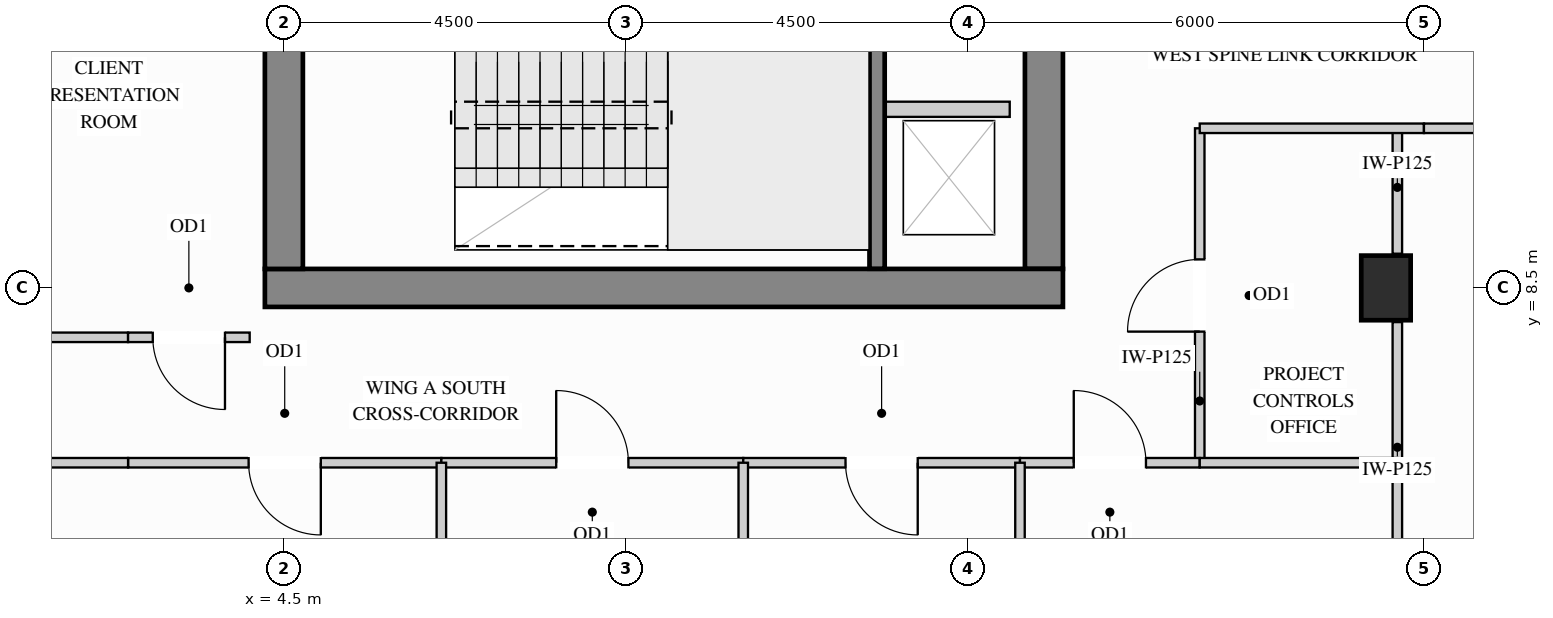
"""IFC4 building model, lengths in metres.
Left out: names, types, materials, properties, quantities, classifications, styles, units other than length and angle.
Written with IfcOpenShell. Run it as: python <this file> out.ifc"""

import sys

from ifc_helpers import new_model, si_unit, direction, frame, frame_2d, origin, origin_2d, place, context, subcontext, project, spatial, rectangle, extrude, source, transform, mapped, element, fill, save


model = new_model("IFC4")
c1 = context("Model", 3, precision=1e-05, world=origin(), true_north=direction((0.0, 1.0)))
c2 = subcontext(c1, "Body", "Model", "MODEL_VIEW")
j1 = project(units=[si_unit("LENGTHUNIT", "METRE"), si_unit("PLANEANGLEUNIT", "RADIAN")], contexts=[c1])
p1 = place(None, origin())
s1 = spatial("IfcSite", under=j1, at=p1, CompositionType="ELEMENT")
p2 = place(p1, origin())
s2 = spatial("IfcBuilding", under=s1, at=p2, CompositionType="ELEMENT")
p3 = place(p2, frame((0.0, 0.0, 219.6)))
s3 = spatial("IfcBuildingStorey", under=s2, at=p3, CompositionType="ELEMENT", Elevation=219.6)
m1 = source(origin(), c2, "Body", "SweptSolid", [
    extrude(rectangle(XDim=0.65, YDim=0.85, at=origin_2d()), origin(), (0.0, 0.0, 1.0), 3.4),
])
p4 = place(p3, frame((19.0, 8.5, 0.0), z_axis=(0.0, 0.0, 1.0), x_axis=(1.0, 0.0, 0.0)))
e1 = element("IfcColumn", 1, at=p4, inside=s3, PredefinedType="COLUMN", context=c2, shape_type="MappedRepresentation", body=[
    mapped(m1, transform((0.0, 0.0, 0.0), x_axis=(1.0, 0.0, 0.0), y_axis=(0.0, 1.0, 0.0), z_axis=(0.0, 0.0, 1.0))),
])
m2 = source(origin(), c2, "Body", "SweptSolid", [
    extrude(rectangle(XDim=10.07, YDim=0.5, at=frame_2d((5.035, 0.0))), origin(), (0.0, 0.0, 1.0), 3.4),
])
p5 = place(p3, frame((14.5, 8.75, 0.0), z_axis=(0.0, 0.0, 1.0), x_axis=(0.0, 1.0, 0.0)))
e2 = element("IfcWall", 2, at=p5, inside=s3, PredefinedType="SHEAR", context=c2, shape_type="MappedRepresentation", body=[
    mapped(m2, transform((0.0, 0.0, 0.0), x_axis=(1.0, 0.0, 0.0), y_axis=(0.0, 1.0, 0.0), z_axis=(0.0, 0.0, 1.0))),
])
m3 = source(origin(), c2, "Body", "SweptSolid", [
    extrude(rectangle(XDim=10.5, YDim=0.5, at=frame_2d((5.25, 0.0))), origin(), (0.0, 0.0, 1.0), 3.4),
])
p6 = place(p3, frame((4.25, 8.5, 0.0), z_axis=(0.0, 0.0, 1.0), x_axis=(1.0, 0.0, 0.0)))
e3 = element("IfcWall", 3, at=p6, inside=s3, PredefinedType="SHEAR", context=c2, shape_type="MappedRepresentation", body=[
    mapped(m3, transform((0.0, 0.0, 0.0), x_axis=(1.0, 0.0, 0.0), y_axis=(0.0, 1.0, 0.0), z_axis=(0.0, 0.0, 1.0))),
])
m4 = source(origin(), c2, "Body", "SweptSolid", [
    extrude(rectangle(XDim=20.5, YDim=0.5, at=frame_2d((10.25, 0.0))), origin(), (0.0, 0.0, 1.0), 3.4),
])
p7 = place(p3, frame((4.5, 8.75, 0.0), z_axis=(0.0, 0.0, 1.0), x_axis=(0.0, 1.0, 0.0)))
e4 = element("IfcWall", 4, at=p7, inside=s3, PredefinedType="SHEAR", context=c2, shape_type="MappedRepresentation", body=[
    mapped(m4, transform((0.0, 0.0, 0.0), x_axis=(1.0, 0.0, 0.0), y_axis=(0.0, 1.0, 0.0), z_axis=(0.0, 0.0, 1.0))),
])
m5 = source(origin(), c2, "Body", "SweptSolid", [
    extrude(rectangle(XDim=3.198, YDim=0.125, at=frame_2d((1.599, 0.0))), origin(), (0.0, 0.0, 1.0), 2.773),
])
p8 = place(p3, frame((19.15, 4.852, 0.0), z_axis=(0.0, 0.0, 1.0), x_axis=(0.0, 1.0, 0.0)))
e5 = element("IfcWall", 5, at=p8, inside=s3, PredefinedType="PARTITIONING", context=c2, shape_type="MappedRepresentation", body=[
    mapped(m5, transform((0.0, 0.0, 0.0), x_axis=(1.0, 0.0, 0.0), y_axis=(0.0, 1.0, 0.0), z_axis=(0.0, 0.0, 1.0))),
])
m6 = source(origin(), c2, "Body", "SweptSolid", [
    extrude(rectangle(XDim=1.65, YDim=0.125, at=frame_2d((0.825, 0.0))), origin(), (0.0, 0.0, 1.0), 2.773),
])
p9 = place(p3, frame((19.15, 8.95, 0.0), z_axis=(0.0, 0.0, 1.0), x_axis=(0.0, 1.0, 0.0)))
e6 = element("IfcWall", 6, at=p9, inside=s3, PredefinedType="PARTITIONING", context=c2, shape_type="MappedRepresentation", body=[
    mapped(m6, transform((0.0, 0.0, 0.0), x_axis=(1.0, 0.0, 0.0), y_axis=(0.0, 1.0, 0.0), z_axis=(0.0, 0.0, 1.0))),
])
p10 = place(p3, frame((16.55, 6.2, 0.0), z_axis=(0.0, 0.0, 1.0), x_axis=(0.0, 1.0, 0.0)))
e7 = element("IfcWall", 7, at=p10, inside=s3, PredefinedType="PARTITIONING", context=c2, shape_type="SweptSolid", body=[
    extrude(rectangle(XDim=4.4, YDim=0.125, at=frame_2d((2.2, 0.0))), origin(), (0.0, 0.0, 1.0), 3.385),
])
p11 = place(p10, frame((1.725, 0.0, 0.0)))
e8 = element("IfcOpeningElement", 8, at=p11, cuts=e7, PredefinedType="OPENING", context=c2, shape_type="SweptSolid", body=[
    extrude(rectangle(XDim=0.95, YDim=2.15, at=frame_2d((0.475, 1.075))), frame((0.0, 0.073, 0.0), z_axis=(0.0, -1.0, 0.0), x_axis=(1.0, 0.0, 0.0)), (0.0, 0.0, 1.0), 0.145),
])
m7 = source(origin(), c2, "Body", "SweptSolid", [
    extrude(rectangle(XDim=2.098, YDim=0.125, at=frame_2d((1.049, 0.0))), origin(), (0.0, 0.0, 1.0), 3.385),
])
p12 = place(p3, frame((0.352, 7.85, 0.0), z_axis=(0.0, 0.0, 1.0), x_axis=(1.0, 0.0, 0.0)))
e9 = element("IfcWall", 9, at=p12, inside=s3, PredefinedType="PARTITIONING", context=c2, shape_type="MappedRepresentation", body=[
    mapped(m7, transform((0.0, 0.0, 0.0), x_axis=(1.0, 0.0, 0.0), y_axis=(0.0, 1.0, 0.0), z_axis=(0.0, 0.0, 1.0))),
])
p13 = place(p3, frame((2.45, 7.85, 0.0), z_axis=(0.0, 0.0, 1.0), x_axis=(1.0, 0.0, 0.0)))
e10 = element("IfcWall", 10, at=p13, inside=s3, PredefinedType="PARTITIONING", context=c2, shape_type="SweptSolid", body=[
    extrude(rectangle(XDim=1.6, YDim=0.125, at=frame_2d((0.8, 0.0))), origin(), (0.0, 0.0, 1.0), 3.385),
])
p14 = place(p13, frame((0.325, 0.0, 0.0)))
e11 = element("IfcOpeningElement", 11, at=p14, cuts=e10, PredefinedType="OPENING", context=c2, shape_type="SweptSolid", body=[
    extrude(rectangle(XDim=0.95, YDim=2.15, at=frame_2d((0.475, 1.075))), frame((0.0, 0.073, 0.0), z_axis=(0.0, -1.0, 0.0), x_axis=(1.0, 0.0, 0.0)), (0.0, 0.0, 1.0), 0.145),
])
m8 = source(origin(), c2, "Body", "SweptSolid", [
    extrude(rectangle(XDim=2.95, YDim=0.125, at=frame_2d((1.475, 0.0))), origin(), (0.0, 0.0, 1.0), 3.385),
])
p15 = place(p3, frame((16.55, 10.6, 0.0), z_axis=(0.0, 0.0, 1.0), x_axis=(1.0, 0.0, 0.0)))
e12 = element("IfcWall", 12, at=p15, inside=s3, PredefinedType="PARTITIONING", context=c2, shape_type="MappedRepresentation", body=[
    mapped(m8, transform((0.0, 0.0, 0.0), x_axis=(1.0, 0.0, 0.0), y_axis=(0.0, 1.0, 0.0), z_axis=(0.0, 0.0, 1.0))),
])
p16 = place(p3, frame((19.5, 10.6, 0.0), z_axis=(0.0, 0.0, 1.0), x_axis=(1.0, 0.0, 0.0)))
e13 = element("IfcWall", 13, at=p16, inside=s3, PredefinedType="PARTITIONING", context=c2, shape_type="SweptSolid", body=[
    extrude(rectangle(XDim=4.35, YDim=0.125, at=frame_2d((2.175, 0.0))), origin(), (0.0, 0.0, 1.0), 3.385),
])
p17 = place(p16, frame((1.7, 0.0, 0.0)))
e14 = element("IfcOpeningElement", 14, at=p17, cuts=e13, PredefinedType="OPENING", context=c2, shape_type="SweptSolid", body=[
    extrude(rectangle(XDim=0.95, YDim=2.15, at=frame_2d((0.475, 1.075))), frame((0.0, 0.073, 0.0), z_axis=(0.0, -1.0, 0.0), x_axis=(1.0, 0.0, 0.0)), (0.0, 0.0, 1.0), 0.145),
])
p18 = place(p3, frame((2.45, 6.2, 0.0), z_axis=(0.0, 0.0, 1.0), x_axis=(1.0, 0.0, 0.0)))
e15 = element("IfcWall", 15, at=p18, inside=s3, PredefinedType="PARTITIONING", context=c2, shape_type="SweptSolid", body=[
    extrude(rectangle(XDim=4.122, YDim=0.125, at=frame_2d((2.061, 0.0))), origin(), (0.0, 0.0, 1.0), 2.848),
])
p19 = place(p18, frame((1.586, 0.0, 0.0)))
e16 = element("IfcOpeningElement", 16, at=p19, cuts=e15, PredefinedType="OPENING", context=c2, shape_type="SweptSolid", body=[
    extrude(rectangle(XDim=0.95, YDim=2.15, at=frame_2d((0.475, 1.075))), frame((0.0, 0.073, 0.0), z_axis=(0.0, -1.0, 0.0), x_axis=(1.0, 0.0, 0.0)), (0.0, 0.0, 1.0), 0.145),
])
p20 = place(p3, frame((6.572, 6.2, 0.0), z_axis=(0.0, 0.0, 1.0), x_axis=(1.0, 0.0, 0.0)))
e17 = element("IfcWall", 17, at=p20, inside=s3, PredefinedType="PARTITIONING", context=c2, shape_type="SweptSolid", body=[
    extrude(rectangle(XDim=3.972, YDim=0.125, at=frame_2d((1.986, 0.0))), origin(), (0.0, 0.0, 1.0), 2.848),
])
p21 = place(p20, frame((1.511, 0.0, 0.0)))
e18 = element("IfcOpeningElement", 18, at=p21, cuts=e17, PredefinedType="OPENING", context=c2, shape_type="SweptSolid", body=[
    extrude(rectangle(XDim=0.95, YDim=2.15, at=frame_2d((0.475, 1.075))), frame((0.0, 0.073, 0.0), z_axis=(0.0, -1.0, 0.0), x_axis=(1.0, 0.0, 0.0)), (0.0, 0.0, 1.0), 0.145),
])
p22 = place(p3, frame((10.544, 6.2, 0.0), z_axis=(0.0, 0.0, 1.0), x_axis=(1.0, 0.0, 0.0)))
e19 = element("IfcWall", 19, at=p22, inside=s3, PredefinedType="PARTITIONING", context=c2, shape_type="SweptSolid", body=[
    extrude(rectangle(XDim=3.641, YDim=0.125, at=frame_2d((1.821, 0.0))), origin(), (0.0, 0.0, 1.0), 2.848),
])
p23 = place(p22, frame((1.345, 0.0, 0.0)))
e20 = element("IfcOpeningElement", 20, at=p23, cuts=e19, PredefinedType="OPENING", context=c2, shape_type="SweptSolid", body=[
    extrude(rectangle(XDim=0.95, YDim=2.15, at=frame_2d((0.475, 1.075))), frame((0.0, 0.073, 0.0), z_axis=(0.0, -1.0, 0.0), x_axis=(1.0, 0.0, 0.0)), (0.0, 0.0, 1.0), 0.145),
])
p24 = place(p3, frame((14.185, 6.2, 0.0), z_axis=(0.0, 0.0, 1.0), x_axis=(1.0, 0.0, 0.0)))
e21 = element("IfcWall", 21, at=p24, inside=s3, PredefinedType="PARTITIONING", context=c2, shape_type="SweptSolid", body=[
    extrude(rectangle(XDim=2.365, YDim=0.125, at=frame_2d((1.183, 0.0))), origin(), (0.0, 0.0, 1.0), 2.848),
])
p25 = place(p24, frame((0.708, 0.0, 0.0)))
e22 = element("IfcOpeningElement", 22, at=p25, cuts=e21, PredefinedType="OPENING", context=c2, shape_type="SweptSolid", body=[
    extrude(rectangle(XDim=0.95, YDim=2.15, at=frame_2d((0.475, 1.075))), frame((0.0, 0.073, 0.0), z_axis=(0.0, -1.0, 0.0), x_axis=(1.0, 0.0, 0.0)), (0.0, 0.0, 1.0), 0.145),
])
m9 = source(origin(), c2, "Body", "SweptSolid", [
    extrude(rectangle(XDim=2.098, YDim=0.125, at=frame_2d((1.049, 0.0))), origin(), (0.0, 0.0, 1.0), 2.848),
])
p26 = place(p3, frame((0.352, 6.2, 0.0), z_axis=(0.0, 0.0, 1.0), x_axis=(1.0, 0.0, 0.0)))
e23 = element("IfcWall", 23, at=p26, inside=s3, PredefinedType="PARTITIONING", context=c2, shape_type="MappedRepresentation", body=[
    mapped(m9, transform((0.0, 0.0, 0.0), x_axis=(1.0, 0.0, 0.0), y_axis=(0.0, 1.0, 0.0), z_axis=(0.0, 0.0, 1.0))),
])
m10 = source(origin(), c2, "Body", "SweptSolid", [
    extrude(rectangle(XDim=2.6, YDim=0.125, at=frame_2d((1.3, 0.0))), origin(), (0.0, 0.0, 1.0), 2.848),
])
p27 = place(p3, frame((16.55, 6.2, 0.0), z_axis=(0.0, 0.0, 1.0), x_axis=(1.0, 0.0, 0.0)))
e24 = element("IfcWall", 24, at=p27, inside=s3, PredefinedType="PARTITIONING", context=c2, shape_type="MappedRepresentation", body=[
    mapped(m10, transform((0.0, 0.0, 0.0), x_axis=(1.0, 0.0, 0.0), y_axis=(0.0, 1.0, 0.0), z_axis=(0.0, 0.0, 1.0))),
])
m11 = source(origin(), c2, "Body", "SweptSolid", [
    extrude(rectangle(XDim=5.848, YDim=0.125, at=frame_2d((2.924, 0.0))), origin(), (0.0, 0.0, 1.0), 3.385),
])
for number, where, z_axis, x_axis in (
    (25, (6.572, 0.352, 0.0), (0.0, 0.0, 1.0), (0.0, 1.0, 0.0)),
    (26, (10.544, 0.352, 0.0), (0.0, 0.0, 1.0), (0.0, 1.0, 0.0)),
):
    element("IfcWall", number, at=place(p3, frame(where, z_axis=z_axis, x_axis=x_axis)), inside=s3, PredefinedType="PARTITIONING", context=c2, shape_type="MappedRepresentation", body=[
        mapped(m11, transform((0.0, 0.0, 0.0), x_axis=(1.0, 0.0, 0.0), y_axis=(0.0, 1.0, 0.0), z_axis=(0.0, 0.0, 1.0))),
    ])
m12 = source(origin(), c2, "Body", "SweptSolid", [
    extrude(rectangle(XDim=5.15, YDim=0.125, at=frame_2d((2.575, 0.0))), origin(), (0.0, 0.0, 1.0), 3.385),
])
p28 = place(p3, frame((14.185, 1.05, 0.0), z_axis=(0.0, 0.0, 1.0), x_axis=(0.0, 1.0, 0.0)))
e27 = element("IfcWall", 27, at=p28, inside=s3, PredefinedType="PARTITIONING", context=c2, shape_type="MappedRepresentation", body=[
    mapped(m12, transform((0.0, 0.0, 0.0), x_axis=(1.0, 0.0, 0.0), y_axis=(0.0, 1.0, 0.0), z_axis=(0.0, 0.0, 1.0))),
])
m13 = source(origin(), c2, "Body", "SweptSolid", [
    extrude(rectangle(XDim=1.63, YDim=0.2, at=frame_2d((0.815, 0.0))), origin(), (0.0, 0.0, 1.0), 3.385),
])
p29 = place(p3, frame((12.42, 10.85, 0.0), z_axis=(0.0, 0.0, 1.0), x_axis=(1.0, 0.0, 0.0)))
e28 = element("IfcWall", 28, at=p29, inside=s3, PredefinedType="PARTITIONING", context=c2, shape_type="MappedRepresentation", body=[
    mapped(m13, transform((0.0, 0.0, 0.0), x_axis=(1.0, 0.0, 0.0), y_axis=(0.0, 1.0, 0.0), z_axis=(0.0, 0.0, 1.0))),
])
m14 = source(origin(), c2, "Body", "SweptSolid", [
    extrude(rectangle(XDim=3.803, YDim=0.2, at=frame_2d((1.901, 0.0))), origin(), (0.0, 0.0, 1.0), 3.4),
])
p30 = place(p3, frame((12.305, 8.752, 0.0), z_axis=(0.0, 0.0, 1.0), x_axis=(0.0, 1.0, 0.0)))
e29 = element("IfcWall", 29, at=p30, inside=s3, PredefinedType="SHEAR", context=c2, shape_type="MappedRepresentation", body=[
    mapped(m14, transform((0.0, 0.0, 0.0), x_axis=(1.0, 0.0, 0.0), y_axis=(0.0, 1.0, 0.0), z_axis=(0.0, 0.0, 1.0))),
])
m15 = source(origin(), c2, "Body", "SweptSolid", [
    extrude(rectangle(XDim=0.95, YDim=2.15, at=frame_2d((0.475, 1.075))), frame((0.0, 0.025, 0.0), z_axis=(0.0, -1.0, 0.0), x_axis=(1.0, 0.0, 0.0)), (0.0, 0.0, 1.0), 0.05),
])
p31 = place(p11, origin())
e30 = element("IfcDoor", 30, at=p31, inside=s3, OperationType="SINGLE_SWING_LEFT", PredefinedType="DOOR", context=c2, shape_type="MappedRepresentation", body=[
    mapped(m15, transform((0.0, 0.0, 0.0), x_axis=(1.0, 0.0, 0.0), y_axis=(0.0, 1.0, 0.0), z_axis=(0.0, 0.0, 1.0))),
])
fill(e8, e30)
p32 = place(p19, origin())
e31 = element("IfcDoor", 31, at=p32, inside=s3, OperationType="SINGLE_SWING_RIGHT", PredefinedType="DOOR", context=c2, shape_type="MappedRepresentation", body=[
    mapped(m15, transform((0.0, 0.0, 0.0), x_axis=(1.0, 0.0, 0.0), y_axis=(0.0, 1.0, 0.0), z_axis=(0.0, 0.0, 1.0))),
])
fill(e16, e31)
p33 = place(p21, origin())
e32 = element("IfcDoor", 32, at=p33, inside=s3, OperationType="SINGLE_SWING_LEFT", PredefinedType="DOOR", context=c2, shape_type="MappedRepresentation", body=[
    mapped(m15, transform((0.0, 0.0, 0.0), x_axis=(1.0, 0.0, 0.0), y_axis=(0.0, 1.0, 0.0), z_axis=(0.0, 0.0, 1.0))),
])
fill(e18, e32)
p34 = place(p23, origin())
e33 = element("IfcDoor", 33, at=p34, inside=s3, OperationType="SINGLE_SWING_RIGHT", PredefinedType="DOOR", context=c2, shape_type="MappedRepresentation", body=[
    mapped(m15, transform((0.0, 0.0, 0.0), x_axis=(1.0, 0.0, 0.0), y_axis=(0.0, 1.0, 0.0), z_axis=(0.0, 0.0, 1.0))),
])
fill(e20, e33)
p35 = place(p25, origin())
e34 = element("IfcDoor", 34, at=p35, inside=s3, OperationType="SINGLE_SWING_LEFT", PredefinedType="DOOR", context=c2, shape_type="MappedRepresentation", body=[
    mapped(m15, transform((0.0, 0.0, 0.0), x_axis=(1.0, 0.0, 0.0), y_axis=(0.0, 1.0, 0.0), z_axis=(0.0, 0.0, 1.0))),
])
fill(e22, e34)
p36 = place(p14, origin())
e35 = element("IfcDoor", 35, at=p36, inside=s3, OperationType="SINGLE_SWING_RIGHT", PredefinedType="DOOR", context=c2, shape_type="MappedRepresentation", body=[
    mapped(m15, transform((0.0, 0.0, 0.0), x_axis=(1.0, 0.0, 0.0), y_axis=(0.0, 1.0, 0.0), z_axis=(0.0, 0.0, 1.0))),
])
fill(e11, e35)
save(model, sys.argv[1])
